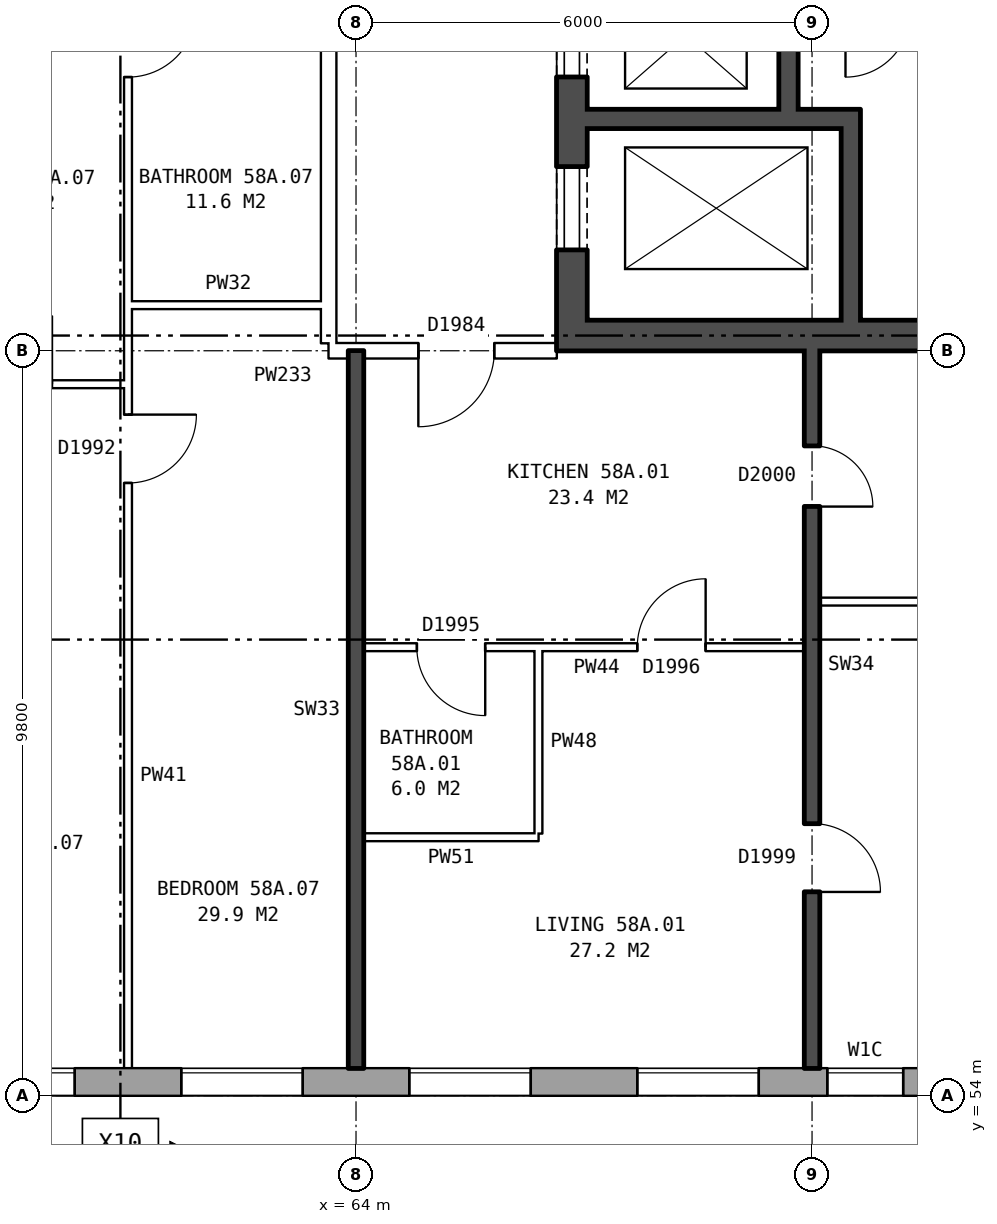
"""IFC4 building model, lengths in metres.
Left out: names, types, materials, properties, quantities, classifications, styles, units other than length and angle.
Written with IfcOpenShell. Run it as: python <this file> out.ifc"""

import sys

from ifc_helpers import new_model, si_unit, direction, frame, frame_2d, origin, place, context, subcontext, project, spatial, rectangle, extrude, element, fill, save


model = new_model("IFC4")
c1 = context("Model", 3, precision=1e-05, world=origin(), true_north=direction((0.0, 1.0)))
c2 = subcontext(c1, "Body", "Model", "MODEL_VIEW")
j1 = project(units=[si_unit("LENGTHUNIT", "METRE"), si_unit("PLANEANGLEUNIT", "RADIAN")], contexts=[c1])
p1 = place(None, origin())
s1 = spatial("IfcSite", under=j1, at=p1, CompositionType="ELEMENT")
p2 = place(p1, origin())
s2 = spatial("IfcBuilding", under=s1, at=p2, CompositionType="ELEMENT")
p3 = place(p2, frame((0.0, 0.0, 205.9)))
s3 = spatial("IfcBuildingStorey", under=s2, at=p3, CompositionType="ELEMENT", Elevation=205.9)
p4 = place(p3, frame((35.075, 54.18, 0.0), z_axis=(0.0, 0.0, 1.0), x_axis=(1.0, 0.0, 0.0)))
e1 = element("IfcWall", 1, at=p4, inside=s3, PredefinedType="STANDARD", context=c2, shape_type="SweptSolid", body=[
    extrude(rectangle(XDim=39.875, YDim=0.36, at=frame_2d((19.938, 0.0))), origin(), (0.0, 0.0, 1.0), 2.85),
])
p5 = place(p4, frame((2.625, 0.0, 0.8)))
e2 = element("IfcOpeningElement", 2, at=p5, cuts=e1, PredefinedType="OPENING", context=c2, shape_type="SweptSolid", body=[
    extrude(rectangle(XDim=1.6, YDim=1.8, at=frame_2d((0.8, 0.9))), frame((0.0, 0.19, 0.0), z_axis=(0.0, -1.0, 0.0), x_axis=(1.0, 0.0, 0.0)), (0.0, 0.0, 1.0), 0.38),
])
p6 = place(p4, frame((5.625, 0.0, 0.8)))
e3 = element("IfcOpeningElement", 3, at=p6, cuts=e1, PredefinedType="OPENING", context=c2, shape_type="SweptSolid", body=[
    extrude(rectangle(XDim=1.6, YDim=1.8, at=frame_2d((0.8, 0.9))), frame((0.0, 0.19, 0.0), z_axis=(0.0, -1.0, 0.0), x_axis=(1.0, 0.0, 0.0)), (0.0, 0.0, 1.0), 0.38),
])
p7 = place(p4, frame((8.625, 0.0, 0.8)))
e4 = element("IfcOpeningElement", 4, at=p7, cuts=e1, PredefinedType="OPENING", context=c2, shape_type="SweptSolid", body=[
    extrude(rectangle(XDim=1.6, YDim=1.8, at=frame_2d((0.8, 0.9))), frame((0.0, 0.19, 0.0), z_axis=(0.0, -1.0, 0.0), x_axis=(1.0, 0.0, 0.0)), (0.0, 0.0, 1.0), 0.38),
])
p8 = place(p4, frame((11.625, 0.0, 0.8)))
e5 = element("IfcOpeningElement", 5, at=p8, cuts=e1, PredefinedType="OPENING", context=c2, shape_type="SweptSolid", body=[
    extrude(rectangle(XDim=1.6, YDim=1.8, at=frame_2d((0.8, 0.9))), frame((0.0, 0.19, 0.0), z_axis=(0.0, -1.0, 0.0), x_axis=(1.0, 0.0, 0.0)), (0.0, 0.0, 1.0), 0.38),
])
p9 = place(p4, frame((14.625, 0.0, 0.8)))
e6 = element("IfcOpeningElement", 6, at=p9, cuts=e1, PredefinedType="OPENING", context=c2, shape_type="SweptSolid", body=[
    extrude(rectangle(XDim=1.6, YDim=1.8, at=frame_2d((0.8, 0.9))), frame((0.0, 0.19, 0.0), z_axis=(0.0, -1.0, 0.0), x_axis=(1.0, 0.0, 0.0)), (0.0, 0.0, 1.0), 0.38),
])
p10 = place(p4, frame((17.625, 0.0, 0.8)))
e7 = element("IfcOpeningElement", 7, at=p10, cuts=e1, PredefinedType="OPENING", context=c2, shape_type="SweptSolid", body=[
    extrude(rectangle(XDim=1.6, YDim=1.8, at=frame_2d((0.8, 0.9))), frame((0.0, 0.19, 0.0), z_axis=(0.0, -1.0, 0.0), x_axis=(1.0, 0.0, 0.0)), (0.0, 0.0, 1.0), 0.38),
])
p11 = place(p4, frame((20.625, 0.0, 0.8)))
e8 = element("IfcOpeningElement", 8, at=p11, cuts=e1, PredefinedType="OPENING", context=c2, shape_type="SweptSolid", body=[
    extrude(rectangle(XDim=1.6, YDim=1.8, at=frame_2d((0.8, 0.9))), frame((0.0, 0.19, 0.0), z_axis=(0.0, -1.0, 0.0), x_axis=(1.0, 0.0, 0.0)), (0.0, 0.0, 1.0), 0.38),
])
p12 = place(p4, frame((23.625, 0.0, 0.8)))
e9 = element("IfcOpeningElement", 9, at=p12, cuts=e1, PredefinedType="OPENING", context=c2, shape_type="SweptSolid", body=[
    extrude(rectangle(XDim=1.6, YDim=1.8, at=frame_2d((0.8, 0.9))), frame((0.0, 0.19, 0.0), z_axis=(0.0, -1.0, 0.0), x_axis=(1.0, 0.0, 0.0)), (0.0, 0.0, 1.0), 0.38),
])
p13 = place(p4, frame((26.625, 0.0, 0.8)))
e10 = element("IfcOpeningElement", 10, at=p13, cuts=e1, PredefinedType="OPENING", context=c2, shape_type="SweptSolid", body=[
    extrude(rectangle(XDim=1.6, YDim=1.8, at=frame_2d((0.8, 0.9))), frame((0.0, 0.19, 0.0), z_axis=(0.0, -1.0, 0.0), x_axis=(1.0, 0.0, 0.0)), (0.0, 0.0, 1.0), 0.38),
])
p14 = place(p4, frame((29.625, 0.0, 0.8)))
e11 = element("IfcOpeningElement", 11, at=p14, cuts=e1, PredefinedType="OPENING", context=c2, shape_type="SweptSolid", body=[
    extrude(rectangle(XDim=1.6, YDim=1.8, at=frame_2d((0.8, 0.9))), frame((0.0, 0.19, 0.0), z_axis=(0.0, -1.0, 0.0), x_axis=(1.0, 0.0, 0.0)), (0.0, 0.0, 1.0), 0.38),
])
p15 = place(p4, frame((32.625, 0.0, 0.8)))
e12 = element("IfcOpeningElement", 12, at=p15, cuts=e1, PredefinedType="OPENING", context=c2, shape_type="SweptSolid", body=[
    extrude(rectangle(XDim=1.6, YDim=1.8, at=frame_2d((0.8, 0.9))), frame((0.0, 0.19, 0.0), z_axis=(0.0, -1.0, 0.0), x_axis=(1.0, 0.0, 0.0)), (0.0, 0.0, 1.0), 0.38),
])
p16 = place(p4, frame((35.125, 0.0, 0.8)))
e13 = element("IfcOpeningElement", 13, at=p16, cuts=e1, PredefinedType="OPENING", context=c2, shape_type="SweptSolid", body=[
    extrude(rectangle(XDim=1.0, YDim=1.8, at=frame_2d((0.5, 0.9))), frame((0.0, 0.19, 0.0), z_axis=(0.0, -1.0, 0.0), x_axis=(1.0, 0.0, 0.0)), (0.0, 0.0, 1.0), 0.38),
])
p17 = place(p4, frame((38.475, 0.0, 0.8)))
e14 = element("IfcOpeningElement", 14, at=p17, cuts=e1, PredefinedType="OPENING", context=c2, shape_type="SweptSolid", body=[
    extrude(rectangle(XDim=1.0, YDim=1.8, at=frame_2d((0.5, 0.9))), frame((0.0, 0.19, 0.0), z_axis=(0.0, -1.0, 0.0), x_axis=(1.0, 0.0, 0.0)), (0.0, 0.0, 1.0), 0.38),
])
p18 = place(p3, frame((66.84, 63.8, 0.0), z_axis=(0.0, 0.0, 1.0), x_axis=(0.0, 1.0, 0.0)))
e15 = element("IfcWall", 15, at=p18, inside=s3, PredefinedType="SHEAR", context=c2, shape_type="SweptSolid", body=[
    extrude(rectangle(XDim=12.4, YDim=0.4, at=frame_2d((6.2, 0.0))), origin(), (0.0, 0.0, 1.0), 2.85),
])
p19 = place(p18, frame((1.325, 0.0, 0.0)))
e16 = element("IfcOpeningElement", 16, at=p19, cuts=e15, PredefinedType="OPENING", context=c2, shape_type="SweptSolid", body=[
    extrude(rectangle(XDim=1.1, YDim=2.1, at=frame_2d((0.55, 1.05))), frame((0.0, 0.21, 0.0), z_axis=(0.0, -1.0, 0.0), x_axis=(1.0, 0.0, 0.0)), (0.0, 0.0, 1.0), 0.42),
])
p20 = place(p18, frame((3.6, 0.0, 0.0)))
e17 = element("IfcOpeningElement", 17, at=p20, cuts=e15, PredefinedType="OPENING", context=c2, shape_type="SweptSolid", body=[
    extrude(rectangle(XDim=1.1, YDim=2.1, at=frame_2d((0.55, 1.05))), frame((0.0, 0.21, 0.0), z_axis=(0.0, -1.0, 0.0), x_axis=(1.0, 0.0, 0.0)), (0.0, 0.0, 1.0), 0.42),
])
p21 = place(p18, frame((5.8, 0.0, 0.0)))
e18 = element("IfcOpeningElement", 18, at=p21, cuts=e15, PredefinedType="OPENING", context=c2, shape_type="SweptSolid", body=[
    extrude(rectangle(XDim=1.1, YDim=2.1, at=frame_2d((0.55, 1.05))), frame((0.0, 0.21, 0.0), z_axis=(0.0, -1.0, 0.0), x_axis=(1.0, 0.0, 0.0)), (0.0, 0.0, 1.0), 0.42),
])
p22 = place(p18, frame((8.0, 0.0, 0.0)))
e19 = element("IfcOpeningElement", 19, at=p22, cuts=e15, PredefinedType="OPENING", context=c2, shape_type="SweptSolid", body=[
    extrude(rectangle(XDim=1.1, YDim=2.1, at=frame_2d((0.55, 1.05))), frame((0.0, 0.21, 0.0), z_axis=(0.0, -1.0, 0.0), x_axis=(1.0, 0.0, 0.0)), (0.0, 0.0, 1.0), 0.42),
])
p23 = place(p18, frame((9.9, 0.0, 0.0)))
e20 = element("IfcOpeningElement", 20, at=p23, cuts=e15, PredefinedType="OPENING", context=c2, shape_type="SweptSolid", body=[
    extrude(rectangle(XDim=1.1, YDim=2.1, at=frame_2d((0.55, 1.05))), frame((0.0, 0.21, 0.0), z_axis=(0.0, -1.0, 0.0), x_axis=(1.0, 0.0, 0.0)), (0.0, 0.0, 1.0), 0.42),
])
p24 = place(p3, frame((67.04, 64.0, 0.0), z_axis=(0.0, 0.0, 1.0), x_axis=(1.0, 0.0, 0.0)))
e21 = element("IfcWall", 21, at=p24, inside=s3, PredefinedType="SHEAR", context=c2, shape_type="SweptSolid", body=[
    extrude(rectangle(XDim=8.2, YDim=0.4, at=frame_2d((4.1, 0.0))), origin(), (0.0, 0.0, 1.0), 2.85),
])
p25 = place(p3, frame((67.04, 66.85, 0.0), z_axis=(0.0, 0.0, 1.0), x_axis=(1.0, 0.0, 0.0)))
e22 = element("IfcWall", 22, at=p25, inside=s3, PredefinedType="SHEAR", context=c2, shape_type="SweptSolid", body=[
    extrude(rectangle(XDim=3.595, YDim=0.25, at=frame_2d((1.797, 0.0))), origin(), (0.0, 0.0, 1.0), 2.85),
])
p26 = place(p3, frame((69.69, 66.975, 0.0), z_axis=(0.0, 0.0, 1.0), x_axis=(0.0, 1.0, 0.0)))
e23 = element("IfcWall", 23, at=p26, inside=s3, PredefinedType="SHEAR", context=c2, shape_type="SweptSolid", body=[
    extrude(rectangle(XDim=6.6, YDim=0.25, at=frame_2d((3.3, 0.0))), origin(), (0.0, 0.0, 1.0), 2.85),
])
p27 = place(p3, frame((70.51, 64.2, 0.0), z_axis=(0.0, 0.0, 1.0), x_axis=(0.0, 1.0, 0.0)))
e24 = element("IfcWall", 24, at=p27, inside=s3, PredefinedType="SHEAR", context=c2, shape_type="SweptSolid", body=[
    extrude(rectangle(XDim=2.525, YDim=0.25, at=frame_2d((1.263, 0.0))), origin(), (0.0, 0.0, 1.0), 2.85),
])
p28 = place(p3, frame((63.64, 63.9, 0.0), z_axis=(0.0, 0.0, 1.0), x_axis=(0.0, 1.0, 0.0)))
e25 = element("IfcWall", 25, at=p28, inside=s3, PredefinedType="PARTITIONING", context=c2, shape_type="SweptSolid", body=[
    extrude(rectangle(XDim=12.2, YDim=0.2, at=frame_2d((6.1, 0.0))), origin(), (0.0, 0.0, 1.0), 2.85),
])
p29 = place(p28, frame((5.1, 0.0, 0.0)))
e26 = element("IfcOpeningElement", 26, at=p29, cuts=e25, PredefinedType="OPENING", context=c2, shape_type="SweptSolid", body=[
    extrude(rectangle(XDim=2.0, YDim=2.1, at=frame_2d((1.0, 1.05))), frame((0.0, 0.11, 0.0), z_axis=(0.0, -1.0, 0.0), x_axis=(1.0, 0.0, 0.0)), (0.0, 0.0, 1.0), 0.22),
])
p30 = place(p3, frame((64.1, 57.4, 0.0), z_axis=(0.0, 0.0, 1.0), x_axis=(1.0, 0.0, 0.0)))
e27 = element("IfcWall", 27, at=p30, inside=s3, PredefinedType="PARTITIONING", context=c2, shape_type="SweptSolid", body=[
    extrude(rectangle(XDim=2.3, YDim=0.1, at=frame_2d((1.15, 0.0))), origin(), (0.0, 0.0, 1.0), 2.85),
])
p31 = place(p3, frame((64.1, 59.9, 0.0), z_axis=(0.0, 0.0, 1.0), x_axis=(1.0, 0.0, 0.0)))
e28 = element("IfcWall", 28, at=p31, inside=s3, PredefinedType="PARTITIONING", context=c2, shape_type="SweptSolid", body=[
    extrude(rectangle(XDim=5.8, YDim=0.1, at=frame_2d((2.9, 0.0))), origin(), (0.0, 0.0, 1.0), 2.85),
])
p32 = place(p31, frame((3.6, 0.0, 0.0)))
e29 = element("IfcOpeningElement", 29, at=p32, cuts=e28, PredefinedType="OPENING", context=c2, shape_type="SweptSolid", body=[
    extrude(rectangle(XDim=0.9, YDim=2.1, at=frame_2d((0.45, 1.05))), frame((0.0, 0.06, 0.0), z_axis=(0.0, -1.0, 0.0), x_axis=(1.0, 0.0, 0.0)), (0.0, 0.0, 1.0), 0.12),
])
p33 = place(p31, frame((0.7, 0.0, 0.0)))
e30 = element("IfcOpeningElement", 30, at=p33, cuts=e28, PredefinedType="OPENING", context=c2, shape_type="SweptSolid", body=[
    extrude(rectangle(XDim=0.9, YDim=2.1, at=frame_2d((0.45, 1.05))), frame((0.0, 0.06, 0.0), z_axis=(0.0, -1.0, 0.0), x_axis=(1.0, 0.0, 0.0)), (0.0, 0.0, 1.0), 0.12),
])
p34 = place(p3, frame((70.1, 60.5, 0.0), z_axis=(0.0, 0.0, 1.0), x_axis=(1.0, 0.0, 0.0)))
e31 = element("IfcWall", 31, at=p34, inside=s3, PredefinedType="PARTITIONING", context=c2, shape_type="SweptSolid", body=[
    extrude(rectangle(XDim=5.8, YDim=0.1, at=frame_2d((2.9, 0.0))), origin(), (0.0, 0.0, 1.0), 2.85),
])
p35 = place(p3, frame((58.1, 63.36, 0.0), z_axis=(0.0, 0.0, 1.0), x_axis=(1.0, 0.0, 0.0)))
e32 = element("IfcWall", 32, at=p35, inside=s3, PredefinedType="PARTITIONING", context=c2, shape_type="SweptSolid", body=[
    extrude(rectangle(XDim=2.9, YDim=0.1, at=frame_2d((1.45, 0.0))), origin(), (0.0, 0.0, 1.0), 2.85),
])
p36 = place(p35, frame((1.0, 0.0, 0.0)))
e33 = element("IfcOpeningElement", 33, at=p36, cuts=e32, PredefinedType="OPENING", context=c2, shape_type="SweptSolid", body=[
    extrude(rectangle(XDim=0.9, YDim=2.1, at=frame_2d((0.45, 1.05))), frame((0.0, 0.06, 0.0), z_axis=(0.0, -1.0, 0.0), x_axis=(1.0, 0.0, 0.0)), (0.0, 0.0, 1.0), 0.12),
])
p37 = place(p3, frame((63.64, 63.8, 0.0), z_axis=(0.0, 0.0, 1.0), x_axis=(1.0, 0.0, 0.0)))
e34 = element("IfcWall", 34, at=p37, inside=s3, PredefinedType="PARTITIONING", context=c2, shape_type="SweptSolid", body=[
    extrude(rectangle(XDim=3.0, YDim=0.2, at=frame_2d((1.5, 0.0))), origin(), (0.0, 0.0, 1.0), 2.85),
])
p38 = place(p37, frame((1.18, 0.0, 0.0)))
e35 = element("IfcOpeningElement", 35, at=p38, cuts=e34, PredefinedType="OPENING", context=c2, shape_type="SweptSolid", body=[
    extrude(rectangle(XDim=1.0, YDim=2.1, at=frame_2d((0.5, 1.05))), frame((0.0, 0.11, 0.0), z_axis=(0.0, -1.0, 0.0), x_axis=(1.0, 0.0, 0.0)), (0.0, 0.0, 1.0), 0.22),
])
p39 = place(p3, frame((61.0, 64.4, 0.0), z_axis=(0.0, 0.0, 1.0), x_axis=(1.0, 0.0, 0.0)))
e36 = element("IfcWall", 36, at=p39, inside=s3, PredefinedType="PARTITIONING", context=c2, shape_type="SweptSolid", body=[
    extrude(rectangle(XDim=2.64, YDim=0.1, at=frame_2d((1.32, 0.0))), origin(), (0.0, 0.0, 1.0), 2.85),
])
p40 = place(p3, frame((61.0, 54.36, 0.0), z_axis=(0.0, 0.0, 1.0), x_axis=(0.0, 1.0, 0.0)))
e37 = element("IfcWall", 37, at=p40, inside=s3, PredefinedType="PARTITIONING", context=c2, shape_type="SweptSolid", body=[
    extrude(rectangle(XDim=14.34, YDim=0.1, at=frame_2d((7.17, 0.0))), origin(), (0.0, 0.0, 1.0), 2.85),
])
p41 = place(p40, frame((7.7, 0.0, 0.0)))
e38 = element("IfcOpeningElement", 38, at=p41, cuts=e37, PredefinedType="OPENING", context=c2, shape_type="SweptSolid", body=[
    extrude(rectangle(XDim=0.9, YDim=2.1, at=frame_2d((0.45, 1.05))), frame((0.0, 0.06, 0.0), z_axis=(0.0, -1.0, 0.0), x_axis=(1.0, 0.0, 0.0)), (0.0, 0.0, 1.0), 0.12),
])
p42 = place(p40, frame((13.04, 0.0, 0.0)))
e39 = element("IfcOpeningElement", 39, at=p42, cuts=e37, PredefinedType="OPENING", context=c2, shape_type="SweptSolid", body=[
    extrude(rectangle(XDim=0.9, YDim=2.1, at=frame_2d((0.45, 1.05))), frame((0.0, 0.06, 0.0), z_axis=(0.0, -1.0, 0.0), x_axis=(1.0, 0.0, 0.0)), (0.0, 0.0, 1.0), 0.12),
])
p43 = place(p3, frame((64.0, 54.36, 0.0), z_axis=(0.0, 0.0, 1.0), x_axis=(0.0, 1.0, 0.0)))
e40 = element("IfcWall", 40, at=p43, inside=s3, PredefinedType="SOLIDWALL", context=c2, shape_type="SweptSolid", body=[
    extrude(rectangle(XDim=9.44, YDim=0.2, at=frame_2d((4.72, 0.0))), origin(), (0.0, 0.0, 1.0), 2.85),
])
p44 = place(p3, frame((66.4, 57.45, 0.0), z_axis=(0.0, 0.0, 1.0), x_axis=(0.0, 1.0, 0.0)))
e41 = element("IfcWall", 41, at=p44, inside=s3, PredefinedType="PARTITIONING", context=c2, shape_type="SweptSolid", body=[
    extrude(rectangle(XDim=2.4, YDim=0.1, at=frame_2d((1.2, 0.0))), origin(), (0.0, 0.0, 1.0), 2.85),
])
p45 = place(p3, frame((70.0, 54.36, 0.0), z_axis=(0.0, 0.0, 1.0), x_axis=(0.0, 1.0, 0.0)))
e42 = element("IfcWall", 42, at=p45, inside=s3, PredefinedType="SOLIDWALL", context=c2, shape_type="SweptSolid", body=[
    extrude(rectangle(XDim=9.44, YDim=0.2, at=frame_2d((4.72, 0.0))), origin(), (0.0, 0.0, 1.0), 2.85),
])
p46 = place(p45, frame((2.32, 0.0, 0.0)))
e43 = element("IfcOpeningElement", 43, at=p46, cuts=e42, PredefinedType="OPENING", context=c2, shape_type="SweptSolid", body=[
    extrude(rectangle(XDim=0.9, YDim=2.1, at=frame_2d((0.45, 1.05))), frame((0.0, 0.11, 0.0), z_axis=(0.0, -1.0, 0.0), x_axis=(1.0, 0.0, 0.0)), (0.0, 0.0, 1.0), 0.22),
])
p47 = place(p45, frame((7.39, 0.0, 0.0)))
e44 = element("IfcOpeningElement", 44, at=p47, cuts=e42, PredefinedType="OPENING", context=c2, shape_type="SweptSolid", body=[
    extrude(rectangle(XDim=0.8, YDim=2.1, at=frame_2d((0.4, 1.05))), frame((0.0, 0.11, 0.0), z_axis=(0.0, -1.0, 0.0), x_axis=(1.0, 0.0, 0.0)), (0.0, 0.0, 1.0), 0.22),
])
p48 = place(p12, origin())
e45 = element("IfcWindow", 45, at=p48, inside=s3, PartitioningType="SINGLE_PANEL", PredefinedType="WINDOW", context=c2, shape_type="SweptSolid", body=[
    extrude(rectangle(XDim=1.6, YDim=1.8, at=frame_2d((0.8, 0.9))), frame((0.0, 0.15, 0.0), z_axis=(0.0, -1.0, 0.0), x_axis=(1.0, 0.0, 0.0)), (0.0, 0.0, 1.0), 0.06),
])
fill(e9, e45)
p49 = place(p13, origin())
e46 = element("IfcWindow", 46, at=p49, inside=s3, PartitioningType="SINGLE_PANEL", PredefinedType="WINDOW", context=c2, shape_type="SweptSolid", body=[
    extrude(rectangle(XDim=1.6, YDim=1.8, at=frame_2d((0.8, 0.9))), frame((0.0, 0.15, 0.0), z_axis=(0.0, -1.0, 0.0), x_axis=(1.0, 0.0, 0.0)), (0.0, 0.0, 1.0), 0.06),
])
fill(e10, e46)
p50 = place(p14, origin())
e47 = element("IfcWindow", 47, at=p50, inside=s3, PartitioningType="SINGLE_PANEL", PredefinedType="WINDOW", context=c2, shape_type="SweptSolid", body=[
    extrude(rectangle(XDim=1.6, YDim=1.8, at=frame_2d((0.8, 0.9))), frame((0.0, 0.15, 0.0), z_axis=(0.0, -1.0, 0.0), x_axis=(1.0, 0.0, 0.0)), (0.0, 0.0, 1.0), 0.06),
])
fill(e11, e47)
p51 = place(p15, origin())
e48 = element("IfcWindow", 48, at=p51, inside=s3, PartitioningType="SINGLE_PANEL", PredefinedType="WINDOW", context=c2, shape_type="SweptSolid", body=[
    extrude(rectangle(XDim=1.6, YDim=1.8, at=frame_2d((0.8, 0.9))), frame((0.0, 0.15, 0.0), z_axis=(0.0, -1.0, 0.0), x_axis=(1.0, 0.0, 0.0)), (0.0, 0.0, 1.0), 0.06),
])
fill(e12, e48)
p52 = place(p16, origin())
e49 = element("IfcWindow", 49, at=p52, inside=s3, PartitioningType="SINGLE_PANEL", PredefinedType="WINDOW", context=c2, shape_type="SweptSolid", body=[
    extrude(rectangle(XDim=1.0, YDim=1.8, at=frame_2d((0.5, 0.9))), frame((0.0, 0.15, 0.0), z_axis=(0.0, -1.0, 0.0), x_axis=(1.0, 0.0, 0.0)), (0.0, 0.0, 1.0), 0.06),
])
fill(e13, e49)
p53 = place(p19, origin())
e50 = element("IfcDoor", 50, at=p53, inside=s3, OperationType="DOUBLE_DOOR_SLIDING", PredefinedType="DOOR", context=c2, shape_type="SweptSolid", body=[
    extrude(rectangle(XDim=1.1, YDim=2.1, at=frame_2d((0.55, 1.05))), frame((0.0, -0.135, 0.0), z_axis=(0.0, -1.0, 0.0), x_axis=(1.0, 0.0, 0.0)), (0.0, 0.0, 1.0), 0.05),
])
fill(e16, e50)
p54 = place(p20, origin())
e51 = element("IfcDoor", 51, at=p54, inside=s3, OperationType="DOUBLE_DOOR_SLIDING", PredefinedType="DOOR", context=c2, shape_type="SweptSolid", body=[
    extrude(rectangle(XDim=1.1, YDim=2.1, at=frame_2d((0.55, 1.05))), frame((0.0, -0.135, 0.0), z_axis=(0.0, -1.0, 0.0), x_axis=(1.0, 0.0, 0.0)), (0.0, 0.0, 1.0), 0.05),
])
fill(e17, e51)
p55 = place(p46, frame((0.9, 0.0, 0.0), z_axis=(0.0, 0.0, 1.0), x_axis=(-1.0, 0.0, 0.0)))
e52 = element("IfcDoor", 52, at=p55, inside=s3, OperationType="SINGLE_SWING_RIGHT", PredefinedType="DOOR", context=c2, shape_type="SweptSolid", body=[
    extrude(rectangle(XDim=0.9, YDim=2.1, at=frame_2d((0.45, 1.05))), frame((0.0, 0.025, 0.0), z_axis=(0.0, -1.0, 0.0), x_axis=(1.0, 0.0, 0.0)), (0.0, 0.0, 1.0), 0.05),
])
fill(e43, e52)
p56 = place(p38, frame((1.0, 0.0, 0.0), z_axis=(0.0, 0.0, 1.0), x_axis=(-1.0, 0.0, 0.0)))
e53 = element("IfcDoor", 53, at=p56, inside=s3, OperationType="SINGLE_SWING_RIGHT", PredefinedType="DOOR", context=c2, shape_type="SweptSolid", body=[
    extrude(rectangle(XDim=1.0, YDim=2.1, at=frame_2d((0.5, 1.05))), frame((0.0, 0.025, 0.0), z_axis=(0.0, -1.0, 0.0), x_axis=(1.0, 0.0, 0.0)), (0.0, 0.0, 1.0), 0.05),
])
fill(e35, e53)
p57 = place(p32, origin())
e54 = element("IfcDoor", 54, at=p57, inside=s3, OperationType="SINGLE_SWING_RIGHT", PredefinedType="DOOR", context=c2, shape_type="SweptSolid", body=[
    extrude(rectangle(XDim=0.9, YDim=2.1, at=frame_2d((0.45, 1.05))), frame((0.0, 0.025, 0.0), z_axis=(0.0, -1.0, 0.0), x_axis=(1.0, 0.0, 0.0)), (0.0, 0.0, 1.0), 0.05),
])
fill(e29, e54)
p58 = place(p47, frame((0.8, 0.0, 0.0), z_axis=(0.0, 0.0, 1.0), x_axis=(-1.0, 0.0, 0.0)))
e55 = element("IfcDoor", 55, at=p58, inside=s3, OperationType="SINGLE_SWING_RIGHT", PredefinedType="DOOR", context=c2, shape_type="SweptSolid", body=[
    extrude(rectangle(XDim=0.8, YDim=2.1, at=frame_2d((0.4, 1.05))), frame((0.0, 0.025, 0.0), z_axis=(0.0, -1.0, 0.0), x_axis=(1.0, 0.0, 0.0)), (0.0, 0.0, 1.0), 0.05),
])
fill(e44, e55)
p59 = place(p33, frame((0.9, 0.0, 0.0), z_axis=(0.0, 0.0, 1.0), x_axis=(-1.0, 0.0, 0.0)))
e56 = element("IfcDoor", 56, at=p59, inside=s3, OperationType="SINGLE_SWING_LEFT", PredefinedType="DOOR", context=c2, shape_type="SweptSolid", body=[
    extrude(rectangle(XDim=0.9, YDim=2.1, at=frame_2d((0.45, 1.05))), frame((0.0, 0.025, 0.0), z_axis=(0.0, -1.0, 0.0), x_axis=(1.0, 0.0, 0.0)), (0.0, 0.0, 1.0), 0.05),
])
fill(e30, e56)
p60 = place(p41, frame((0.9, 0.0, 0.0), z_axis=(0.0, 0.0, 1.0), x_axis=(-1.0, 0.0, 0.0)))
e57 = element("IfcDoor", 57, at=p60, inside=s3, OperationType="SINGLE_SWING_LEFT", PredefinedType="DOOR", context=c2, shape_type="SweptSolid", body=[
    extrude(rectangle(XDim=0.9, YDim=2.1, at=frame_2d((0.45, 1.05))), frame((0.0, 0.025, 0.0), z_axis=(0.0, -1.0, 0.0), x_axis=(1.0, 0.0, 0.0)), (0.0, 0.0, 1.0), 0.05),
])
fill(e38, e57)
p61 = place(p42, frame((0.9, 0.0, 0.0), z_axis=(0.0, 0.0, 1.0), x_axis=(-1.0, 0.0, 0.0)))
e58 = element("IfcDoor", 58, at=p61, inside=s3, OperationType="SINGLE_SWING_LEFT", PredefinedType="DOOR", context=c2, shape_type="SweptSolid", body=[
    extrude(rectangle(XDim=0.9, YDim=2.1, at=frame_2d((0.45, 1.05))), frame((0.0, 0.025, 0.0), z_axis=(0.0, -1.0, 0.0), x_axis=(1.0, 0.0, 0.0)), (0.0, 0.0, 1.0), 0.05),
])
fill(e39, e58)
save(model, sys.argv[1])
